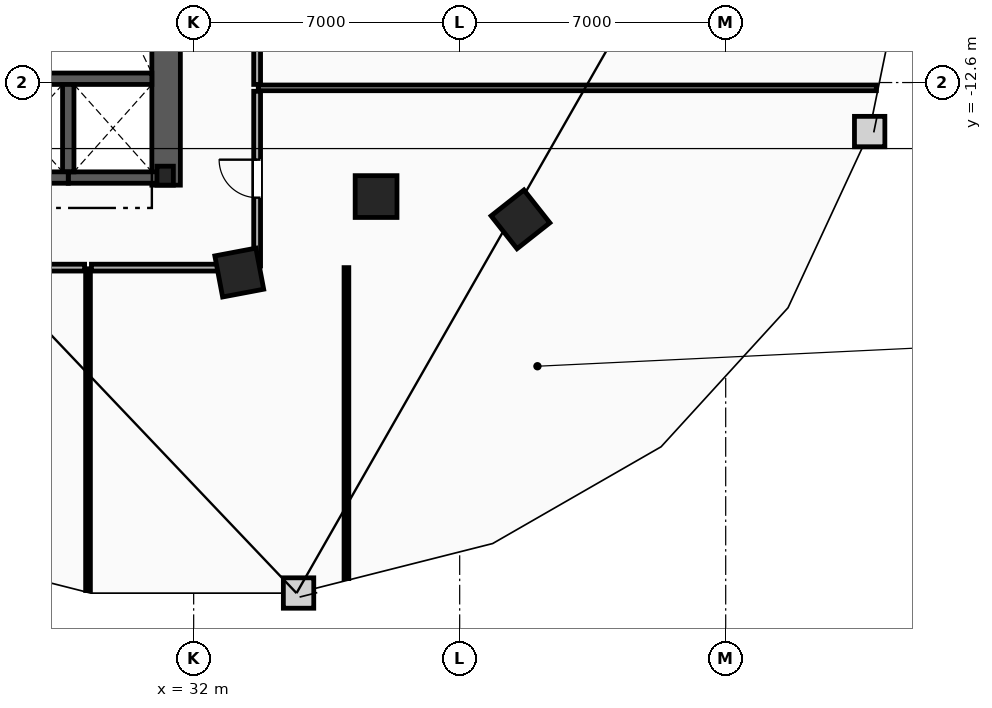
"""IFC4 building model, lengths in metres.
Left out: names, types, materials, properties, quantities, classifications, styles, units other than length and angle.
Written with IfcOpenShell. Run it as: python <this file> out.ifc"""

import sys

from ifc_helpers import new_model, si_unit, direction, frame, frame_2d, origin, origin_2d, place, context, subcontext, project, spatial, rectangle, i_section, extrude, element, fill, save


model = new_model("IFC4")
c1 = context("Model", 3, precision=1e-05, world=origin(), true_north=direction((0.0, 1.0)))
c2 = subcontext(c1, "Body", "Model", "MODEL_VIEW")
j1 = project(units=[si_unit("LENGTHUNIT", "METRE"), si_unit("PLANEANGLEUNIT", "RADIAN")], contexts=[c1])
p1 = place(None, origin())
s1 = spatial("IfcSite", under=j1, at=p1, CompositionType="ELEMENT")
p2 = place(p1, origin())
s2 = spatial("IfcBuilding", under=s1, at=p2, CompositionType="ELEMENT")
p3 = place(p2, frame((0.0, 0.0, 81.8)))
s3 = spatial("IfcBuildingStorey", under=s2, at=p3, CompositionType="ELEMENT", Elevation=81.8)
p4 = place(p3, frame((31.25, -15.05, 0.0), z_axis=(0.0, 0.0, 1.0), x_axis=(1.0, 0.0, 0.0)))
e1 = element("IfcColumn", 1, at=p4, inside=s3, PredefinedType="COLUMN", context=c2, shape_type="SweptSolid", body=[
    extrude(i_section(OverallWidth=0.432, OverallDepth=0.498, WebThickness=0.056, FlangeThickness=0.089, FilletRadius=0.018, at=origin_2d()), origin(), (0.0, 0.0, 1.0), 3.6),
])
for number, where, z_axis, x_axis in (
    (2, (36.8, -15.6, 0.0), (0.0, 0.0, 1.0), (1.0, 0.0, 0.0)),
    (3, (33.2, -17.6, 0.0), (0.0, 0.0, 1.0), (0.983, 0.186, 0.0)),
    (4, (40.6, -16.2, 0.0), (0.0, 0.0, 1.0), (0.785, 0.619, 0.0)),
):
    element("IfcColumn", number, at=place(p3, frame(where, z_axis=z_axis, x_axis=x_axis)), inside=s3, PredefinedType="COLUMN", context=c2, shape_type="SweptSolid", body=[
        extrude(rectangle(XDim=1.1, YDim=1.1, at=origin_2d()), origin(), (0.0, 0.0, 1.0), 3.6),
    ])
p5 = place(p3, frame((31.275, -15.3, 0.0), z_axis=(0.0, 0.0, 1.0), x_axis=(0.0, 1.0, 0.0)))
e5 = element("IfcWall", 5, at=p5, inside=s3, PredefinedType="SHEAR", context=c2, shape_type="SweptSolid", body=[
    extrude(rectangle(XDim=13.33, YDim=0.75, at=frame_2d((6.665, 0.0))), origin(), (0.0, 0.0, 1.0), 3.3),
])
p6 = place(p3, frame((27.74, -12.5, 0.0), z_axis=(0.0, 0.0, 1.0), x_axis=(1.0, 0.0, 0.0)))
e6 = element("IfcWall", 6, at=p6, inside=s3, PredefinedType="SHEAR", context=c2, shape_type="SweptSolid", body=[
    extrude(rectangle(XDim=3.16, YDim=0.3, at=frame_2d((1.58, 0.0))), origin(), (0.0, 0.0, 1.0), 3.3),
])
p7 = place(p3, frame((28.7, -15.1, 0.0), z_axis=(0.0, 0.0, 1.0), x_axis=(1.0, 0.0, 0.0)))
e7 = element("IfcWall", 7, at=p7, inside=s3, PredefinedType="SHEAR", context=c2, shape_type="SweptSolid", body=[
    extrude(rectangle(XDim=2.5, YDim=0.3, at=frame_2d((1.25, 0.0))), origin(), (0.0, 0.0, 1.0), 3.3),
])
p8 = place(p3, frame((28.7, -14.95, 0.0), z_axis=(0.0, 0.0, 1.0), x_axis=(0.0, 1.0, 0.0)))
e8 = element("IfcWall", 8, at=p8, inside=s3, PredefinedType="SHEAR", context=c2, shape_type="SweptSolid", body=[
    extrude(rectangle(XDim=2.3, YDim=0.3, at=frame_2d((1.15, 0.0))), origin(), (0.0, 0.0, 1.0), 3.3),
])
p9 = place(p3, frame((26.2, -15.1, 0.0), z_axis=(0.0, 0.0, 1.0), x_axis=(1.0, 0.0, 0.0)))
e9 = element("IfcWall", 9, at=p9, inside=s3, PredefinedType="SHEAR", context=c2, shape_type="SweptSolid", body=[
    extrude(rectangle(XDim=2.5, YDim=0.3, at=frame_2d((1.25, 0.0))), origin(), (0.0, 0.0, 1.0), 3.3),
])
p10 = place(p3, frame((33.7, -12.74, 0.0), z_axis=(0.0, 0.0, 1.0), x_axis=(1.0, 0.0, 0.0)))
e10 = element("IfcWall", 10, at=p10, inside=s3, PredefinedType="PARTITIONING", context=c2, shape_type="SweptSolid", body=[
    extrude(rectangle(XDim=16.264, YDim=0.15, at=frame_2d((8.132, 0.0))), origin(), (0.0, 0.0, 1.0), 3.3),
])
p11 = place(p3, frame((29.22, -25.966, 0.0), z_axis=(0.0, 0.0, 1.0), x_axis=(0.0, 1.0, 0.0)))
e11 = element("IfcWall", 11, at=p11, inside=s3, PredefinedType="PARTITIONING", context=c2, shape_type="SweptSolid", body=[
    extrude(rectangle(XDim=8.466, YDim=0.125, at=frame_2d((4.233, 0.0))), origin(), (0.0, 0.0, 1.0), 3.3),
])
p12 = place(p3, frame((36.02, -25.652, 0.0), z_axis=(0.0, 0.0, 1.0), x_axis=(0.0, 1.0, 0.0)))
e12 = element("IfcWall", 12, at=p12, inside=s3, PredefinedType="PARTITIONING", context=c2, shape_type="SweptSolid", body=[
    extrude(rectangle(XDim=8.182, YDim=0.125, at=frame_2d((4.091, 0.0))), origin(), (0.0, 0.0, 1.0), 3.3),
])
p13 = place(p3, frame((33.67, -17.428, 0.0), z_axis=(0.0, 0.0, 1.0), x_axis=(0.0, 1.0, 0.0)))
e13 = element("IfcWall", 13, at=p13, inside=s3, PredefinedType="PARTITIONING", context=c2, shape_type="SweptSolid", body=[
    extrude(rectangle(XDim=4.598, YDim=0.18, at=frame_2d((2.299, 0.0))), origin(), (0.0, 0.0, 1.0), 3.3),
])
p14 = place(p13, frame((1.799, 0.0, 0.0)))
e14 = element("IfcOpeningElement", 14, at=p14, cuts=e13, PredefinedType="OPENING", context=c2, shape_type="SweptSolid", body=[
    extrude(rectangle(XDim=1.0, YDim=2.15, at=frame_2d((0.5, 1.075))), frame((0.0, 0.1, 0.0), z_axis=(0.0, -1.0, 0.0), x_axis=(1.0, 0.0, 0.0)), (0.0, 0.0, 1.0), 0.2),
])
p15 = place(p3, frame((29.31, -17.47, 0.0), z_axis=(0.0, 0.0, 1.0), x_axis=(1.0, 0.0, 0.0)))
e15 = element("IfcWall", 15, at=p15, inside=s3, PredefinedType="PARTITIONING", context=c2, shape_type="SweptSolid", body=[
    extrude(rectangle(XDim=4.318, YDim=0.18, at=frame_2d((2.159, 0.0))), origin(), (0.0, 0.0, 1.0), 3.3),
])
p16 = place(p3, frame((33.67, -12.65, 0.0), z_axis=(0.0, 0.0, 1.0), x_axis=(0.0, 1.0, 0.0)))
e16 = element("IfcWall", 16, at=p16, inside=s3, PredefinedType="PARTITIONING", context=c2, shape_type="SweptSolid", body=[
    extrude(rectangle(XDim=3.299, YDim=0.18, at=frame_2d((1.649, 0.0))), origin(), (0.0, 0.0, 1.0), 3.3),
])
p17 = place(p16, frame((1.149, 0.0, 0.0)))
e17 = element("IfcOpeningElement", 17, at=p17, cuts=e16, PredefinedType="OPENING", context=c2, shape_type="SweptSolid", body=[
    extrude(rectangle(XDim=1.0, YDim=2.15, at=frame_2d((0.5, 1.075))), frame((0.0, 0.1, 0.0), z_axis=(0.0, -1.0, 0.0), x_axis=(1.0, 0.0, 0.0)), (0.0, 0.0, 1.0), 0.2),
])
p18 = place(p3, frame((16.822, -17.47, 0.0), z_axis=(0.0, 0.0, 1.0), x_axis=(1.0, 0.0, 0.0)))
e18 = element("IfcWall", 18, at=p18, inside=s3, PredefinedType="PARTITIONING", context=c2, shape_type="SweptSolid", body=[
    extrude(rectangle(XDim=12.308, YDim=0.18, at=frame_2d((6.154, 0.0))), origin(), (0.0, 0.0, 1.0), 3.3),
])
p19 = place(p14, origin())
e19 = element("IfcDoor", 19, at=p19, inside=s3, OperationType="SINGLE_SWING_RIGHT", PredefinedType="DOOR", context=c2, shape_type="SweptSolid", body=[
    extrude(rectangle(XDim=1.0, YDim=2.15, at=frame_2d((0.5, 1.075))), frame((0.0, 0.025, 0.0), z_axis=(0.0, -1.0, 0.0), x_axis=(1.0, 0.0, 0.0)), (0.0, 0.0, 1.0), 0.05),
])
fill(e14, e19)
save(model, sys.argv[1])
